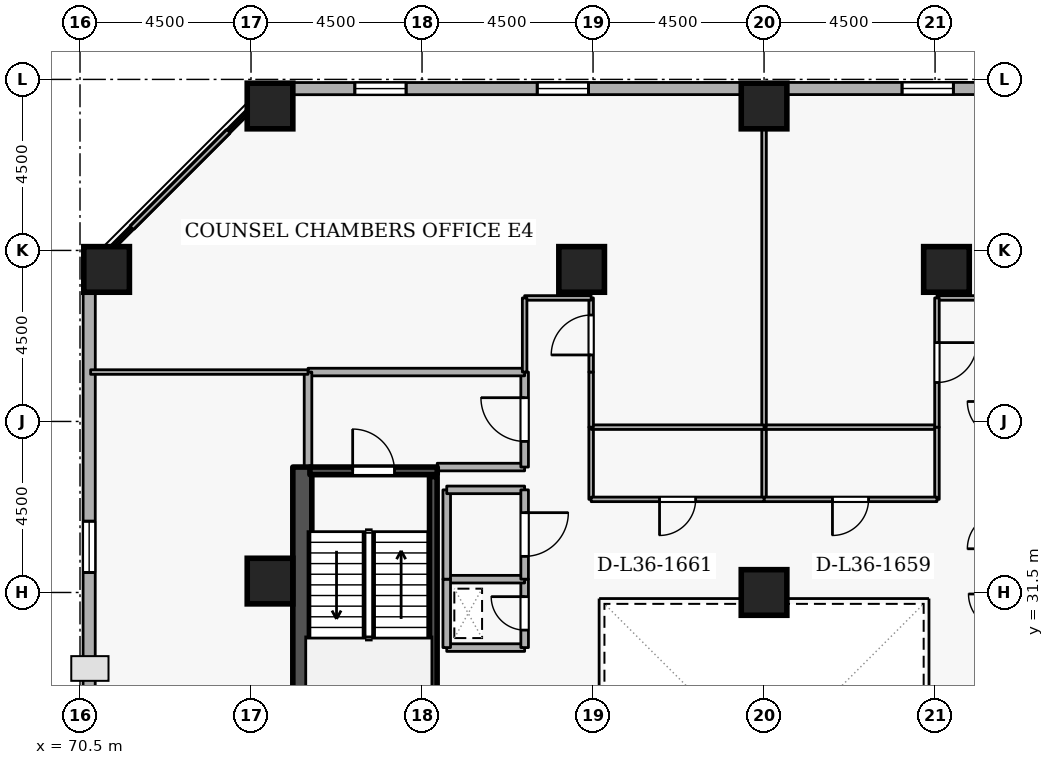
"""IFC4 building model, lengths in metres.
Left out: names, types, materials, properties, quantities, classifications, styles, units other than length and angle.
Written with IfcOpenShell. Run it as: python <this file> out.ifc"""

import sys

from ifc_helpers import new_model, si_unit, direction, frame, frame_2d, origin, origin_2d, place, context, subcontext, project, spatial, rectangle, extrude, element, fill, save


model = new_model("IFC4")
c1 = context("Model", 3, precision=1e-05, world=origin(), true_north=direction((0.0, 1.0)))
c2 = subcontext(c1, "Body", "Model", "MODEL_VIEW")
j1 = project(units=[si_unit("LENGTHUNIT", "METRE"), si_unit("PLANEANGLEUNIT", "RADIAN")], contexts=[c1])
p1 = place(None, origin())
s1 = spatial("IfcSite", under=j1, at=p1, CompositionType="ELEMENT")
p2 = place(p1, origin())
s2 = spatial("IfcBuilding", under=s1, at=p2, CompositionType="ELEMENT")
p3 = place(p2, frame((0.0, 0.0, 137.7)))
s3 = spatial("IfcBuildingStorey", under=s2, at=p3, CompositionType="ELEMENT", Elevation=137.7)
p4 = place(p3, frame((76.35, 19.2, 0.0), z_axis=(0.0, 0.0, 1.0), x_axis=(0.0, 1.0, 0.0)))
e1 = element("IfcWall", 1, at=p4, inside=s3, PredefinedType="SHEAR", context=c2, shape_type="SweptSolid", body=[
    extrude(rectangle(XDim=15.6, YDim=0.5, at=frame_2d((7.8, 0.0))), origin(), (0.0, 0.0, 1.0), 3.6),
])
for number, where, z_axis, x_axis in (
    (2, (88.5, 44.3, 0.0), (0.0, 0.0, 1.0), (1.0, 0.0, 0.0)),
    (3, (75.5, 44.3, 0.0), (0.0, 0.0, 1.0), (1.0, 0.0, 0.0)),
    (4, (71.2, 40.0, 0.0), (0.0, 0.0, 1.0), (1.0, 0.0, 0.0)),
    (5, (93.3, 40.0, 0.0), (0.0, 0.0, 1.0), (1.0, 0.0, 0.0)),
    (6, (83.7, 40.0, 0.0), (0.0, 0.0, 1.0), (1.0, 0.0, 0.0)),
    (7, (75.5, 31.8, 0.0), (0.0, 0.0, 1.0), (1.0, 0.0, 0.0)),
    (8, (88.5, 31.5, 0.0), (0.0, 0.0, 1.0), (1.0, 0.0, 0.0)),
):
    element("IfcColumn", number, at=place(p3, frame(where, z_axis=z_axis, x_axis=x_axis)), inside=s3, PredefinedType="COLUMN", context=c2, shape_type="SweptSolid", body=[
        extrude(rectangle(XDim=1.2, YDim=1.2, at=origin_2d()), origin(), (0.0, 0.0, 1.0), 3.6),
    ])
p5 = place(p3, frame((109.681, 44.765, 0.0), z_axis=(0.0, 0.0, 1.0), x_axis=(-0.99999997701, -0.000214431216, 0.0)))
e9 = element("IfcWall", 9, at=p5, inside=s3, PredefinedType="STANDARD", context=c2, shape_type="SweptSolid", body=[
    extrude(rectangle(XDim=34.156, YDim=0.32, at=frame_2d((17.078, 0.0))), origin(), (0.0, 0.0, 1.0), 2.66),
])
p6 = place(p5, frame((1.8, 0.0, 0.72)))
e10 = element("IfcOpeningElement", 10, at=p6, cuts=e9, PredefinedType="OPENING", context=c2, shape_type="SweptSolid", body=[
    extrude(rectangle(XDim=1.35, YDim=1.05, at=frame_2d((0.675, 0.525))), frame((0.0, 0.17, 0.0), z_axis=(0.0, -1.0, 0.0), x_axis=(1.0, 0.0, 0.0)), (0.0, 0.0, 1.0), 0.34),
])
p7 = place(p5, frame((11.4, 0.0, 0.72)))
e11 = element("IfcOpeningElement", 11, at=p7, cuts=e9, PredefinedType="OPENING", context=c2, shape_type="SweptSolid", body=[
    extrude(rectangle(XDim=1.35, YDim=1.05, at=frame_2d((0.675, 0.525))), frame((0.0, 0.17, 0.0), z_axis=(0.0, -1.0, 0.0), x_axis=(1.0, 0.0, 0.0)), (0.0, 0.0, 1.0), 0.34),
])
p8 = place(p5, frame((16.2, 0.0, 0.72)))
e12 = element("IfcOpeningElement", 12, at=p8, cuts=e9, PredefinedType="OPENING", context=c2, shape_type="SweptSolid", body=[
    extrude(rectangle(XDim=1.35, YDim=1.05, at=frame_2d((0.675, 0.525))), frame((0.0, 0.17, 0.0), z_axis=(0.0, -1.0, 0.0), x_axis=(1.0, 0.0, 0.0)), (0.0, 0.0, 1.0), 0.34),
])
p9 = place(p5, frame((25.8, 0.0, 0.72)))
e13 = element("IfcOpeningElement", 13, at=p9, cuts=e9, PredefinedType="OPENING", context=c2, shape_type="SweptSolid", body=[
    extrude(rectangle(XDim=1.35, YDim=1.05, at=frame_2d((0.675, 0.525))), frame((0.0, 0.17, 0.0), z_axis=(0.0, -1.0, 0.0), x_axis=(1.0, 0.0, 0.0)), (0.0, 0.0, 1.0), 0.34),
])
p10 = place(p5, frame((30.6, 0.0, 0.72)))
e14 = element("IfcOpeningElement", 14, at=p10, cuts=e9, PredefinedType="OPENING", context=c2, shape_type="SweptSolid", body=[
    extrude(rectangle(XDim=1.35, YDim=1.05, at=frame_2d((0.675, 0.525))), frame((0.0, 0.17, 0.0), z_axis=(0.0, -1.0, 0.0), x_axis=(1.0, 0.0, 0.0)), (0.0, 0.0, 1.0), 0.34),
])
p11 = place(p3, frame((70.743, 39.975, 0.0), z_axis=(0.0, 0.0, 1.0), x_axis=(-0.000214431216, -0.99999997701, 0.0)))
e15 = element("IfcWall", 15, at=p11, inside=s3, PredefinedType="STANDARD", context=c2, shape_type="SweptSolid", body=[
    extrude(rectangle(XDim=34.156, YDim=0.32, at=frame_2d((17.078, 0.0))), origin(), (0.0, 0.0, 1.0), 2.66),
])
p12 = place(p11, frame((6.6, 0.0, 0.72)))
e16 = element("IfcOpeningElement", 16, at=p12, cuts=e15, PredefinedType="OPENING", context=c2, shape_type="SweptSolid", body=[
    extrude(rectangle(XDim=1.35, YDim=1.05, at=frame_2d((0.675, 0.525))), frame((0.0, 0.17, 0.0), z_axis=(0.0, -1.0, 0.0), x_axis=(1.0, 0.0, 0.0)), (0.0, 0.0, 1.0), 0.34),
])
p13 = place(p11, frame((21.0, 0.0, 0.72)))
e17 = element("IfcOpeningElement", 17, at=p13, cuts=e15, PredefinedType="OPENING", context=c2, shape_type="SweptSolid", body=[
    extrude(rectangle(XDim=1.35, YDim=1.05, at=frame_2d((0.675, 0.525))), frame((0.0, 0.17, 0.0), z_axis=(0.0, -1.0, 0.0), x_axis=(1.0, 0.0, 0.0)), (0.0, 0.0, 1.0), 0.34),
])
p14 = place(p11, frame((30.6, 0.0, 0.72)))
e18 = element("IfcOpeningElement", 18, at=p14, cuts=e15, PredefinedType="OPENING", context=c2, shape_type="SweptSolid", body=[
    extrude(rectangle(XDim=1.35, YDim=1.05, at=frame_2d((0.675, 0.525))), frame((0.0, 0.17, 0.0), z_axis=(0.0, -1.0, 0.0), x_axis=(1.0, 0.0, 0.0)), (0.0, 0.0, 1.0), 0.34),
])
p15 = place(p3, frame((76.55, 34.7, 0.0), z_axis=(0.0, 0.0, 1.0), x_axis=(1.0, 0.0, 0.0)))
e19 = element("IfcWall", 19, at=p15, inside=s3, PredefinedType="SHEAR", context=c2, shape_type="SweptSolid", body=[
    extrude(rectangle(XDim=3.35, YDim=0.2, at=frame_2d((1.675, 0.0))), origin(), (0.0, 0.0, 1.0), 3.6),
])
p16 = place(p15, frame((1.125, 0.0, 0.0)))
e20 = element("IfcOpeningElement", 20, at=p16, cuts=e19, PredefinedType="OPENING", context=c2, shape_type="SweptSolid", body=[
    extrude(rectangle(XDim=1.1, YDim=2.1, at=frame_2d((0.55, 1.05))), frame((0.0, 0.11, 0.0), z_axis=(0.0, -1.0, 0.0), x_axis=(1.0, 0.0, 0.0)), (0.0, 0.0, 1.0), 0.22),
])
p17 = place(p3, frame((79.797, 27.45, 0.0), z_axis=(0.0, 0.0, 1.0), x_axis=(0.0, 1.0, 0.0)))
e21 = element("IfcWall", 21, at=p17, inside=s3, PredefinedType="SHEAR", context=c2, shape_type="SweptSolid", body=[
    extrude(rectangle(XDim=7.1, YDim=0.2, at=frame_2d((3.55, 0.0))), origin(), (0.0, 0.0, 1.0), 3.6),
])
p18 = place(p3, frame((79.9, 34.8, 0.0), z_axis=(0.0, 0.0, 1.0), x_axis=(1.0, 0.0, 0.0)))
e22 = element("IfcWall", 22, at=p18, inside=s3, PredefinedType="STANDARD", context=c2, shape_type="SweptSolid", body=[
    extrude(rectangle(XDim=2.3, YDim=0.2, at=frame_2d((1.15, 0.0))), origin(), (0.0, 0.0, 1.0), 2.465),
])
p19 = place(p3, frame((82.2, 34.8, 0.0), z_axis=(0.0, 0.0, 1.0), x_axis=(0.0, 1.0, 0.0)))
e23 = element("IfcWall", 23, at=p19, inside=s3, PredefinedType="STANDARD", context=c2, shape_type="SweptSolid", body=[
    extrude(rectangle(XDim=2.5, YDim=0.2, at=frame_2d((1.25, 0.0))), origin(), (0.0, 0.0, 1.0), 3.26),
])
p20 = place(p19, frame((0.675, 0.0, 0.0)))
e24 = element("IfcOpeningElement", 24, at=p20, cuts=e23, PredefinedType="OPENING", context=c2, shape_type="SweptSolid", body=[
    extrude(rectangle(XDim=1.15, YDim=2.1, at=frame_2d((0.575, 1.05))), frame((0.0, 0.11, 0.0), z_axis=(0.0, -1.0, 0.0), x_axis=(1.0, 0.0, 0.0)), (0.0, 0.0, 1.0), 0.22),
])
p21 = place(p3, frame((82.2, 37.3, 0.0), z_axis=(0.0, 0.0, 1.0), x_axis=(-1.0, 0.0, 0.0)))
e25 = element("IfcWall", 25, at=p21, inside=s3, PredefinedType="STANDARD", context=c2, shape_type="SweptSolid", body=[
    extrude(rectangle(XDim=5.7, YDim=0.2, at=frame_2d((2.85, 0.0))), origin(), (0.0, 0.0, 1.0), 3.26),
])
p22 = place(p3, frame((76.5, 37.3, 0.0), z_axis=(0.0, 0.0, 1.0), x_axis=(0.0, -1.0, 0.0)))
e26 = element("IfcWall", 26, at=p22, inside=s3, PredefinedType="STANDARD", context=c2, shape_type="SweptSolid", body=[
    extrude(rectangle(XDim=2.5, YDim=0.2, at=frame_2d((1.25, 0.0))), origin(), (0.0, 0.0, 1.0), 3.26),
])
p23 = place(p3, frame((80.15, 30.05, 0.0), z_axis=(0.0, 0.0, 1.0), x_axis=(1.0, 0.0, 0.0)))
e27 = element("IfcWall", 27, at=p23, inside=s3, PredefinedType="STANDARD", context=c2, shape_type="SweptSolid", body=[
    extrude(rectangle(XDim=2.05, YDim=0.2, at=frame_2d((1.025, 0.0))), origin(), (0.0, 0.0, 1.0), 3.26),
])
p24 = place(p3, frame((82.2, 30.05, 0.0), z_axis=(0.0, 0.0, 1.0), x_axis=(0.0, 1.0, 0.0)))
e28 = element("IfcWall", 28, at=p24, inside=s3, PredefinedType="STANDARD", context=c2, shape_type="SweptSolid", body=[
    extrude(rectangle(XDim=1.8, YDim=0.2, at=frame_2d((0.9, 0.0))), origin(), (0.0, 0.0, 1.0), 3.26),
])
p25 = place(p24, frame((0.46, 0.0, 0.0)))
e29 = element("IfcOpeningElement", 29, at=p25, cuts=e28, PredefinedType="OPENING", context=c2, shape_type="SweptSolid", body=[
    extrude(rectangle(XDim=0.88, YDim=2.04, at=frame_2d((0.44, 1.02))), frame((0.0, 0.11, 0.0), z_axis=(0.0, -1.0, 0.0), x_axis=(1.0, 0.0, 0.0)), (0.0, 0.0, 1.0), 0.22),
])
p26 = place(p3, frame((82.2, 31.85, 0.0), z_axis=(0.0, 0.0, 1.0), x_axis=(-1.0, 0.0, 0.0)))
e30 = element("IfcWall", 30, at=p26, inside=s3, PredefinedType="STANDARD", context=c2, shape_type="SweptSolid", body=[
    extrude(rectangle(XDim=2.05, YDim=0.2, at=frame_2d((1.025, 0.0))), origin(), (0.0, 0.0, 1.0), 3.26),
])
p27 = place(p3, frame((80.15, 31.85, 0.0), z_axis=(0.0, 0.0, 1.0), x_axis=(0.0, -1.0, 0.0)))
e31 = element("IfcWall", 31, at=p27, inside=s3, PredefinedType="STANDARD", context=c2, shape_type="SweptSolid", body=[
    extrude(rectangle(XDim=1.8, YDim=0.2, at=frame_2d((0.9, 0.0))), origin(), (0.0, 0.0, 1.0), 3.26),
])
p28 = place(p3, frame((80.15, 31.85, 0.0), z_axis=(0.0, 0.0, 1.0), x_axis=(0.0, 1.0, 0.0)))
e32 = element("IfcWall", 32, at=p28, inside=s3, PredefinedType="STANDARD", context=c2, shape_type="SweptSolid", body=[
    extrude(rectangle(XDim=2.35, YDim=0.2, at=frame_2d((1.175, 0.0))), origin(), (0.0, 0.0, 1.0), 3.26),
])
p29 = place(p3, frame((80.15, 34.2, 0.0), z_axis=(0.0, 0.0, 1.0), x_axis=(1.0, 0.0, 0.0)))
e33 = element("IfcWall", 33, at=p29, inside=s3, PredefinedType="STANDARD", context=c2, shape_type="SweptSolid", body=[
    extrude(rectangle(XDim=2.05, YDim=0.2, at=frame_2d((1.025, 0.0))), origin(), (0.0, 0.0, 1.0), 2.465),
])
p30 = place(p3, frame((82.2, 34.2, 0.0), z_axis=(0.0, 0.0, 1.0), x_axis=(0.0, -1.0, 0.0)))
e34 = element("IfcWall", 34, at=p30, inside=s3, PredefinedType="STANDARD", context=c2, shape_type="SweptSolid", body=[
    extrude(rectangle(XDim=2.35, YDim=0.2, at=frame_2d((1.175, 0.0))), origin(), (0.0, 0.0, 1.0), 3.26),
])
p31 = place(p30, frame((0.6, 0.0, 0.0)))
e35 = element("IfcOpeningElement", 35, at=p31, cuts=e34, PredefinedType="OPENING", context=c2, shape_type="SweptSolid", body=[
    extrude(rectangle(XDim=1.15, YDim=2.1, at=frame_2d((0.575, 1.05))), frame((0.0, 0.11, 0.0), z_axis=(0.0, -1.0, 0.0), x_axis=(1.0, 0.0, 0.0)), (0.0, 0.0, 1.0), 0.22),
])
p32 = place(p3, frame((88.5, 33.95, 0.0), z_axis=(0.0, 0.0, 1.0), x_axis=(0.0, 1.0, 0.0)))
e36 = element("IfcWall", 36, at=p32, inside=s3, PredefinedType="PARTITIONING", context=c2, shape_type="SweptSolid", body=[
    extrude(rectangle(XDim=1.9, YDim=0.12, at=frame_2d((0.95, 0.0))), origin(), (0.0, 0.0, 1.0), 2.802),
])
p33 = place(p3, frame((88.5, 35.85, 0.0), z_axis=(0.0, 0.0, 1.0), x_axis=(1.0, 0.0, 0.0)))
e37 = element("IfcWall", 37, at=p33, inside=s3, PredefinedType="PARTITIONING", context=c2, shape_type="SweptSolid", body=[
    extrude(rectangle(XDim=4.55, YDim=0.12, at=frame_2d((2.275, 0.0))), origin(), (0.0, 0.0, 1.0), 3.26),
])
p34 = place(p3, frame((93.05, 35.85, 0.0), z_axis=(0.0, 0.0, 1.0), x_axis=(0.0, -1.0, 0.0)))
e38 = element("IfcWall", 38, at=p34, inside=s3, PredefinedType="PARTITIONING", context=c2, shape_type="SweptSolid", body=[
    extrude(rectangle(XDim=1.9, YDim=0.12, at=frame_2d((0.95, 0.0))), origin(), (0.0, 0.0, 1.0), 3.26),
])
p35 = place(p3, frame((93.05, 33.95, 0.0), z_axis=(0.0, 0.0, 1.0), x_axis=(-1.0, 0.0, 0.0)))
e39 = element("IfcWall", 39, at=p35, inside=s3, PredefinedType="PARTITIONING", context=c2, shape_type="SweptSolid", body=[
    extrude(rectangle(XDim=4.55, YDim=0.12, at=frame_2d((2.275, 0.0))), origin(), (0.0, 0.0, 1.0), 3.26),
])
p36 = place(p35, frame((1.8, 0.0, 0.0)))
e40 = element("IfcOpeningElement", 40, at=p36, cuts=e39, PredefinedType="OPENING", context=c2, shape_type="SweptSolid", body=[
    extrude(rectangle(XDim=0.95, YDim=2.1, at=frame_2d((0.475, 1.05))), frame((0.0, 0.07, 0.0), z_axis=(0.0, -1.0, 0.0), x_axis=(1.0, 0.0, 0.0)), (0.0, 0.0, 1.0), 0.14),
])
p37 = place(p3, frame((94.8, 39.25, 0.0), z_axis=(0.0, 0.0, 1.0), x_axis=(-1.0, 0.0, 0.0)))
e41 = element("IfcWall", 41, at=p37, inside=s3, PredefinedType="PARTITIONING", context=c2, shape_type="SweptSolid", body=[
    extrude(rectangle(XDim=1.75, YDim=0.12, at=frame_2d((0.875, 0.0))), origin(), (0.0, 0.0, 1.0), 3.26),
])
p38 = place(p3, frame((93.05, 39.25, 0.0), z_axis=(0.0, 0.0, 1.0), x_axis=(0.0, -1.0, 0.0)))
e42 = element("IfcWall", 42, at=p38, inside=s3, PredefinedType="PARTITIONING", context=c2, shape_type="SweptSolid", body=[
    extrude(rectangle(XDim=3.4, YDim=0.12, at=frame_2d((1.7, 0.0))), origin(), (0.0, 0.0, 1.0), 3.26),
])
p39 = place(p38, frame((1.175, 0.0, 0.0)))
e43 = element("IfcOpeningElement", 43, at=p39, cuts=e42, PredefinedType="OPENING", context=c2, shape_type="SweptSolid", body=[
    extrude(rectangle(XDim=1.05, YDim=2.1, at=frame_2d((0.525, 1.05))), frame((0.0, 0.07, 0.0), z_axis=(0.0, -1.0, 0.0), x_axis=(1.0, 0.0, 0.0)), (0.0, 0.0, 1.0), 0.14),
])
p40 = place(p3, frame((88.5, 35.85, 0.0), z_axis=(0.0, 0.0, 1.0), x_axis=(0.0, 1.0, 0.0)))
e44 = element("IfcWall", 44, at=p40, inside=s3, PredefinedType="PARTITIONING", context=c2, shape_type="SweptSolid", body=[
    extrude(rectangle(XDim=8.87, YDim=0.12, at=frame_2d((4.435, 0.0))), origin(), (0.0, 0.0, 1.0), 2.802),
])
p41 = place(p3, frame((83.95, 33.95, 0.0), z_axis=(0.0, 0.0, 1.0), x_axis=(0.0, 1.0, 0.0)))
e45 = element("IfcWall", 45, at=p41, inside=s3, PredefinedType="PARTITIONING", context=c2, shape_type="SweptSolid", body=[
    extrude(rectangle(XDim=1.9, YDim=0.12, at=frame_2d((0.95, 0.0))), origin(), (0.0, 0.0, 1.0), 3.26),
])
p42 = place(p3, frame((83.95, 35.85, 0.0), z_axis=(0.0, 0.0, 1.0), x_axis=(1.0, 0.0, 0.0)))
e46 = element("IfcWall", 46, at=p42, inside=s3, PredefinedType="PARTITIONING", context=c2, shape_type="SweptSolid", body=[
    extrude(rectangle(XDim=4.55, YDim=0.12, at=frame_2d((2.275, 0.0))), origin(), (0.0, 0.0, 1.0), 3.26),
])
p43 = place(p3, frame((88.5, 33.95, 0.0), z_axis=(0.0, 0.0, 1.0), x_axis=(-1.0, 0.0, 0.0)))
e47 = element("IfcWall", 47, at=p43, inside=s3, PredefinedType="PARTITIONING", context=c2, shape_type="SweptSolid", body=[
    extrude(rectangle(XDim=4.55, YDim=0.12, at=frame_2d((2.275, 0.0))), origin(), (0.0, 0.0, 1.0), 3.26),
])
p44 = place(p43, frame((1.8, 0.0, 0.0)))
e48 = element("IfcOpeningElement", 48, at=p44, cuts=e47, PredefinedType="OPENING", context=c2, shape_type="SweptSolid", body=[
    extrude(rectangle(XDim=0.95, YDim=2.1, at=frame_2d((0.475, 1.05))), frame((0.0, 0.07, 0.0), z_axis=(0.0, -1.0, 0.0), x_axis=(1.0, 0.0, 0.0)), (0.0, 0.0, 1.0), 0.14),
])
p45 = place(p3, frame((83.95, 35.85, 0.0), z_axis=(0.0, 0.0, 1.0), x_axis=(0.0, 1.0, 0.0)))
e49 = element("IfcWall", 49, at=p45, inside=s3, PredefinedType="PARTITIONING", context=c2, shape_type="SweptSolid", body=[
    extrude(rectangle(XDim=1.45, YDim=0.12, at=frame_2d((0.725, 0.0))), origin(), (0.0, 0.0, 1.0), 3.26),
])
p46 = place(p3, frame((83.95, 37.3, 0.0), z_axis=(0.0, 0.0, 1.0), x_axis=(0.0, 1.0, 0.0)))
e50 = element("IfcWall", 50, at=p46, inside=s3, PredefinedType="PARTITIONING", context=c2, shape_type="SweptSolid", body=[
    extrude(rectangle(XDim=1.95, YDim=0.12, at=frame_2d((0.975, 0.0))), origin(), (0.0, 0.0, 1.0), 3.26),
])
p47 = place(p46, frame((0.45, 0.0, 0.0)))
e51 = element("IfcOpeningElement", 51, at=p47, cuts=e50, PredefinedType="OPENING", context=c2, shape_type="SweptSolid", body=[
    extrude(rectangle(XDim=1.05, YDim=2.1, at=frame_2d((0.525, 1.05))), frame((0.0, 0.07, 0.0), z_axis=(0.0, -1.0, 0.0), x_axis=(1.0, 0.0, 0.0)), (0.0, 0.0, 1.0), 0.14),
])
p48 = place(p3, frame((83.95, 39.25, 0.0), z_axis=(0.0, 0.0, 1.0), x_axis=(-1.0, 0.0, 0.0)))
e52 = element("IfcWall", 52, at=p48, inside=s3, PredefinedType="PARTITIONING", context=c2, shape_type="SweptSolid", body=[
    extrude(rectangle(XDim=1.75, YDim=0.12, at=frame_2d((0.875, 0.0))), origin(), (0.0, 0.0, 1.0), 3.26),
])
p49 = place(p3, frame((82.2, 39.25, 0.0), z_axis=(0.0, 0.0, 1.0), x_axis=(0.0, -1.0, 0.0)))
e53 = element("IfcWall", 53, at=p49, inside=s3, PredefinedType="PARTITIONING", context=c2, shape_type="SweptSolid", body=[
    extrude(rectangle(XDim=1.95, YDim=0.12, at=frame_2d((0.975, 0.0))), origin(), (0.0, 0.0, 1.0), 3.26),
])
p50 = place(p3, frame((76.5, 37.3, 0.0), z_axis=(0.0, 0.0, 1.0), x_axis=(-1.0, 0.0, 0.0)))
e54 = element("IfcWall", 54, at=p50, inside=s3, PredefinedType="PARTITIONING", context=c2, shape_type="SweptSolid", body=[
    extrude(rectangle(XDim=5.72, YDim=0.12, at=frame_2d((2.86, 0.0))), origin(), (0.0, 0.0, 1.0), 3.26),
])
p51 = place(p3, frame((70.78, 40.01, 0.0), z_axis=(0.0, 0.0, 1.0), x_axis=(0.707106781187, 0.707106781187, 0.0)))
e55 = element("IfcWall", 55, at=p51, inside=s3, PredefinedType="PARTITIONING", context=c2, shape_type="SweptSolid", body=[
    extrude(rectangle(XDim=6.66, YDim=0.12, at=frame_2d((3.33, 0.0))), origin(), (0.0, 0.0, 1.0), 3.26),
])
p52 = place(p8, origin())
e56 = element("IfcWindow", 56, at=p52, inside=s3, PartitioningType="SINGLE_PANEL", PredefinedType="WINDOW", context=c2, shape_type="SweptSolid", body=[
    extrude(rectangle(XDim=1.35, YDim=1.05, at=frame_2d((0.675, 0.525))), frame((0.0, 0.03, 0.0), z_axis=(0.0, -1.0, 0.0), x_axis=(1.0, 0.0, 0.0)), (0.0, 0.0, 1.0), 0.06),
])
fill(e12, e56)
p53 = place(p9, origin())
e57 = element("IfcWindow", 57, at=p53, inside=s3, PartitioningType="SINGLE_PANEL", PredefinedType="WINDOW", context=c2, shape_type="SweptSolid", body=[
    extrude(rectangle(XDim=1.35, YDim=1.05, at=frame_2d((0.675, 0.525))), frame((0.0, 0.03, 0.0), z_axis=(0.0, -1.0, 0.0), x_axis=(1.0, 0.0, 0.0)), (0.0, 0.0, 1.0), 0.06),
])
fill(e13, e57)
p54 = place(p10, origin())
e58 = element("IfcWindow", 58, at=p54, inside=s3, PartitioningType="SINGLE_PANEL", PredefinedType="WINDOW", context=c2, shape_type="SweptSolid", body=[
    extrude(rectangle(XDim=1.35, YDim=1.05, at=frame_2d((0.675, 0.525))), frame((0.0, 0.03, 0.0), z_axis=(0.0, -1.0, 0.0), x_axis=(1.0, 0.0, 0.0)), (0.0, 0.0, 1.0), 0.06),
])
fill(e14, e58)
p55 = place(p12, origin())
e59 = element("IfcWindow", 59, at=p55, inside=s3, PartitioningType="SINGLE_PANEL", PredefinedType="WINDOW", context=c2, shape_type="SweptSolid", body=[
    extrude(rectangle(XDim=1.35, YDim=1.05, at=frame_2d((0.675, 0.525))), frame((0.0, 0.03, 0.0), z_axis=(0.0, -1.0, 0.0), x_axis=(1.0, 0.0, 0.0)), (0.0, 0.0, 1.0), 0.06),
])
fill(e16, e59)
p56 = place(p16, origin())
e60 = element("IfcDoor", 60, at=p56, inside=s3, OperationType="SINGLE_SWING_LEFT", PredefinedType="DOOR", context=c2, shape_type="SweptSolid", body=[
    extrude(rectangle(XDim=1.1, YDim=2.1, at=frame_2d((0.55, 1.05))), frame((0.0, 0.025, 0.0), z_axis=(0.0, -1.0, 0.0), x_axis=(1.0, 0.0, 0.0)), (0.0, 0.0, 1.0), 0.05),
])
fill(e20, e60)
p57 = place(p20, origin())
e61 = element("IfcDoor", 61, at=p57, inside=s3, OperationType="SINGLE_SWING_RIGHT", PredefinedType="DOOR", context=c2, shape_type="SweptSolid", body=[
    extrude(rectangle(XDim=1.15, YDim=2.1, at=frame_2d((0.575, 1.05))), frame((0.0, 0.025, 0.0), z_axis=(0.0, -1.0, 0.0), x_axis=(1.0, 0.0, 0.0)), (0.0, 0.0, 1.0), 0.05),
])
fill(e24, e61)
p58 = place(p25, origin())
e62 = element("IfcDoor", 62, at=p58, inside=s3, OperationType="SINGLE_SWING_RIGHT", PredefinedType="DOOR", context=c2, shape_type="SweptSolid", body=[
    extrude(rectangle(XDim=0.88, YDim=2.04, at=frame_2d((0.44, 1.02))), frame((0.0, 0.025, 0.0), z_axis=(0.0, -1.0, 0.0), x_axis=(1.0, 0.0, 0.0)), (0.0, 0.0, 1.0), 0.05),
])
fill(e29, e62)
p59 = place(p31, origin())
e63 = element("IfcDoor", 63, at=p59, inside=s3, OperationType="SINGLE_SWING_LEFT", PredefinedType="DOOR", context=c2, shape_type="SweptSolid", body=[
    extrude(rectangle(XDim=1.15, YDim=2.1, at=frame_2d((0.575, 1.05))), frame((0.0, 0.025, 0.0), z_axis=(0.0, -1.0, 0.0), x_axis=(1.0, 0.0, 0.0)), (0.0, 0.0, 1.0), 0.05),
])
fill(e35, e63)
p60 = place(p36, origin())
e64 = element("IfcDoor", 64, at=p60, inside=s3, OperationType="SINGLE_SWING_RIGHT", PredefinedType="DOOR", context=c2, shape_type="SweptSolid", body=[
    extrude(rectangle(XDim=0.95, YDim=2.1, at=frame_2d((0.475, 1.05))), frame((0.0, 0.025, 0.0), z_axis=(0.0, -1.0, 0.0), x_axis=(1.0, 0.0, 0.0)), (0.0, 0.0, 1.0), 0.05),
])
fill(e40, e64)
p61 = place(p39, origin())
e65 = element("IfcDoor", 65, at=p61, inside=s3, OperationType="SINGLE_SWING_LEFT", PredefinedType="DOOR", context=c2, shape_type="SweptSolid", body=[
    extrude(rectangle(XDim=1.05, YDim=2.1, at=frame_2d((0.525, 1.05))), frame((0.0, 0.025, 0.0), z_axis=(0.0, -1.0, 0.0), x_axis=(1.0, 0.0, 0.0)), (0.0, 0.0, 1.0), 0.05),
])
fill(e43, e65)
p62 = place(p44, origin())
e66 = element("IfcDoor", 66, at=p62, inside=s3, OperationType="SINGLE_SWING_RIGHT", PredefinedType="DOOR", context=c2, shape_type="SweptSolid", body=[
    extrude(rectangle(XDim=0.95, YDim=2.1, at=frame_2d((0.475, 1.05))), frame((0.0, 0.025, 0.0), z_axis=(0.0, -1.0, 0.0), x_axis=(1.0, 0.0, 0.0)), (0.0, 0.0, 1.0), 0.05),
])
fill(e48, e66)
p63 = place(p47, origin())
e67 = element("IfcDoor", 67, at=p63, inside=s3, OperationType="SINGLE_SWING_LEFT", PredefinedType="DOOR", context=c2, shape_type="SweptSolid", body=[
    extrude(rectangle(XDim=1.05, YDim=2.1, at=frame_2d((0.525, 1.05))), frame((0.0, 0.025, 0.0), z_axis=(0.0, -1.0, 0.0), x_axis=(1.0, 0.0, 0.0)), (0.0, 0.0, 1.0), 0.05),
])
fill(e51, e67)
save(model, sys.argv[1])
